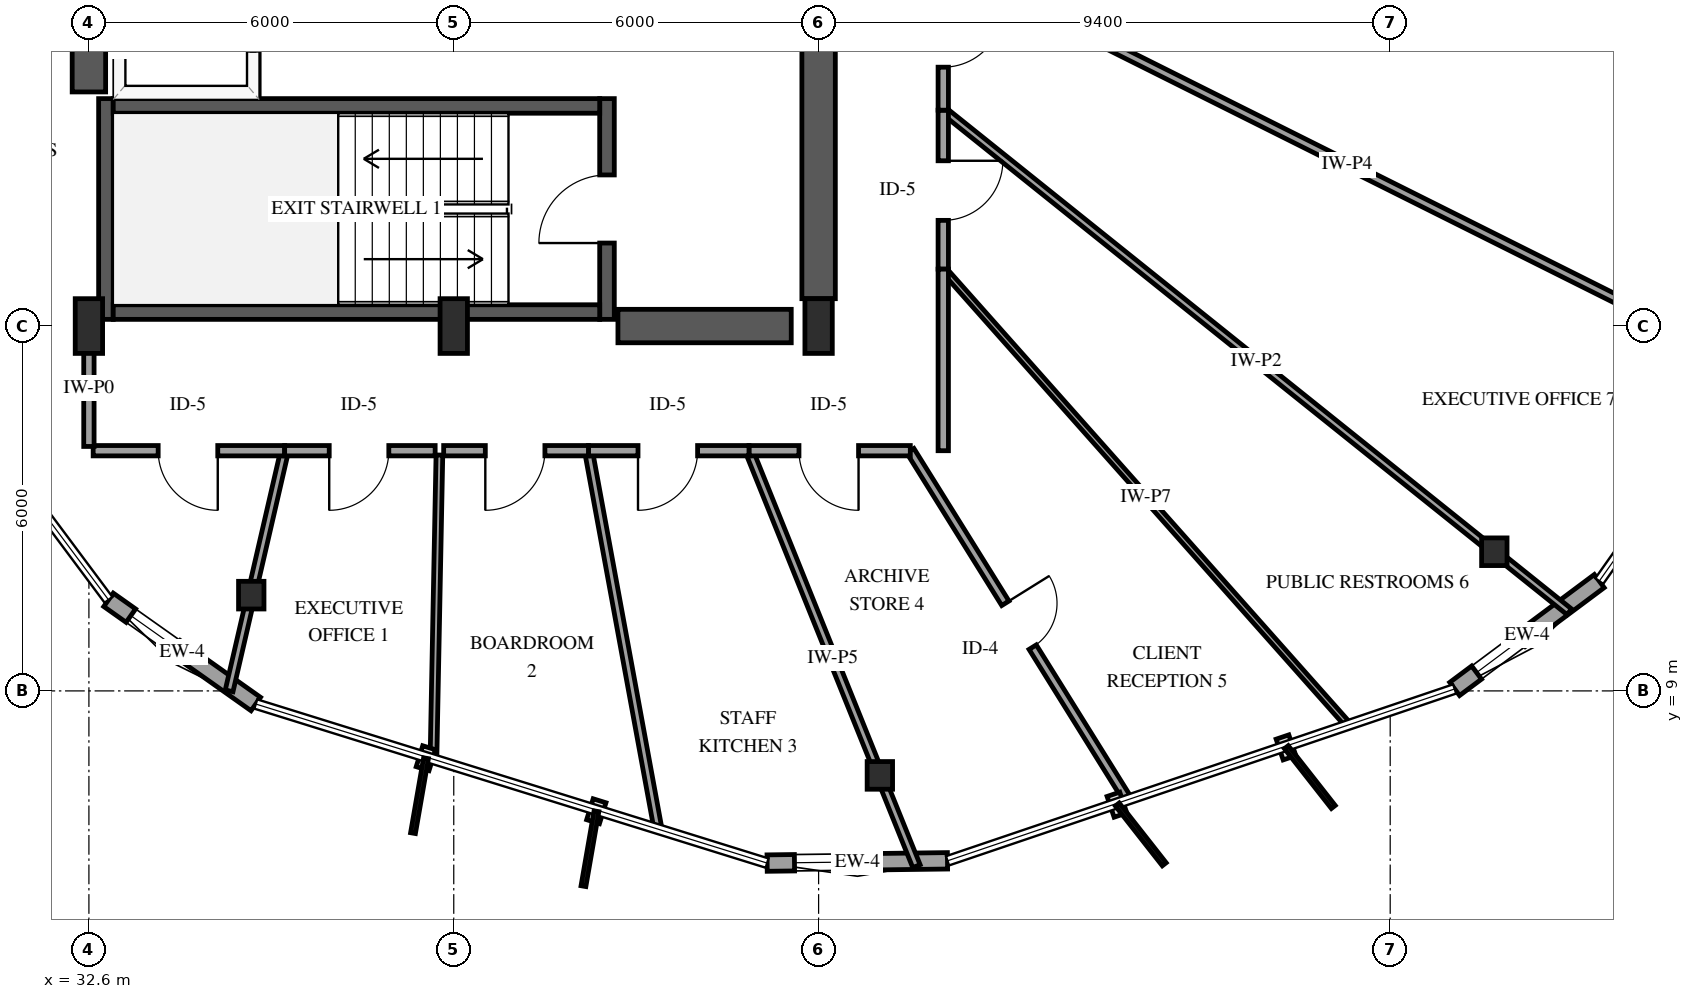
"""IFC4 building model, lengths in metres.
Left out: names, types, materials, properties, quantities, classifications, styles, units other than length and angle.
Written with IfcOpenShell. Run it as: python <this file> out.ifc"""

import sys

from ifc_helpers import new_model, si_unit, direction, frame, frame_2d, origin, origin_2d, place, context, subcontext, project, spatial, rectangle, i_section, extrude, element, fill, save


model = new_model("IFC4")
c1 = context("Model", 3, precision=1e-05, world=origin(), true_north=direction((0.0, 1.0)))
c2 = subcontext(c1, "Body", "Model", "MODEL_VIEW")
j1 = project(units=[si_unit("LENGTHUNIT", "METRE"), si_unit("PLANEANGLEUNIT", "RADIAN")], contexts=[c1])
p1 = place(None, origin())
s1 = spatial("IfcSite", under=j1, at=p1, CompositionType="ELEMENT")
p2 = place(p1, origin())
s2 = spatial("IfcBuilding", under=s1, at=p2, CompositionType="ELEMENT")
p3 = place(p2, frame((0.0, 0.0, 106.9)))
s3 = spatial("IfcBuildingStorey", under=s2, at=p3, CompositionType="ELEMENT", Elevation=106.9)
p4 = place(p3, frame((32.88, 15.11, 0.0), z_axis=(0.0, 0.0, 1.0), x_axis=(0.0, 1.0, 0.0)))
e1 = element("IfcWall", 1, at=p4, inside=s3, PredefinedType="SHEAR", context=c2, shape_type="SweptSolid", body=[
    extrude(rectangle(XDim=3.63, YDim=0.24, at=frame_2d((1.815, 0.0))), origin(), (0.0, 0.0, 1.0), 3.9),
])
p5 = place(p3, frame((41.12, 15.11, 0.0), z_axis=(0.0, 0.0, 1.0), x_axis=(0.0, 1.0, 0.0)))
e2 = element("IfcWall", 2, at=p5, inside=s3, PredefinedType="SHEAR", context=c2, shape_type="SweptSolid", body=[
    extrude(rectangle(XDim=3.63, YDim=0.24, at=frame_2d((1.815, 0.0))), origin(), (0.0, 0.0, 1.0), 3.9),
])
p6 = place(p5, frame((1.255, 0.0, 0.0)))
e3 = element("IfcOpeningElement", 3, at=p6, cuts=e2, PredefinedType="OPENING", context=c2, shape_type="SweptSolid", body=[
    extrude(rectangle(XDim=1.12, YDim=2.15, at=frame_2d((0.56, 1.075))), frame((0.0, 0.13, 0.0), z_axis=(0.0, -1.0, 0.0), x_axis=(1.0, 0.0, 0.0)), (0.0, 0.0, 1.0), 0.26),
])
for number, where, z_axis, x_axis in (
    (4, (33.0, 15.23, 0.0), (0.0, 0.0, 1.0), (1.0, 0.0, 0.0)),
    (5, (33.0, 18.62, 0.0), (0.0, 0.0, 1.0), (1.0, 0.0, 0.0)),
):
    element("IfcWall", number, at=place(p3, frame(where, z_axis=z_axis, x_axis=x_axis)), inside=s3, PredefinedType="SHEAR", context=c2, shape_type="SweptSolid", body=[
        extrude(rectangle(XDim=8.0, YDim=0.24, at=frame_2d((4.0, 0.0))), origin(), (0.0, 0.0, 1.0), 3.9),
    ])
p7 = place(p3, frame((32.6, 18.85, 0.0), z_axis=(0.0, 0.0, 1.0), x_axis=(0.0, 1.0, 0.0)))
e6 = element("IfcWall", 6, at=p7, inside=s3, PredefinedType="SHEAR", context=c2, shape_type="SweptSolid", body=[
    extrude(rectangle(XDim=12.3, YDim=0.55, at=frame_2d((6.15, 0.0))), origin(), (0.0, 0.0, 1.0), 3.9),
])
p8 = place(p3, frame((41.3, 15.0, 0.0), z_axis=(0.0, 0.0, 1.0), x_axis=(1.0, 0.0, 0.0)))
e7 = element("IfcWall", 7, at=p8, inside=s3, PredefinedType="SHEAR", context=c2, shape_type="SweptSolid", body=[
    extrude(rectangle(XDim=2.85, YDim=0.55, at=frame_2d((1.425, 0.0))), origin(), (0.0, 0.0, 1.0), 3.9),
])
p9 = place(p3, frame((44.6, 15.45, 0.0), z_axis=(0.0, 0.0, 1.0), x_axis=(0.0, 1.0, 0.0)))
e8 = element("IfcWall", 8, at=p9, inside=s3, PredefinedType="SHEAR", context=c2, shape_type="SweptSolid", body=[
    extrude(rectangle(XDim=6.35, YDim=0.55, at=frame_2d((3.175, 0.0))), origin(), (0.0, 0.0, 1.0), 3.9),
])
for number, where, z_axis, x_axis in (
    (9, (32.6, 15.0, 0.0), (0.0, 0.0, 1.0), (1.0, 0.0, 0.0)),
    (10, (38.6, 15.0, 0.0), (0.0, 0.0, 1.0), (1.0, 0.0, 0.0)),
    (11, (44.6, 15.0, 0.0), (0.0, 0.0, 1.0), (1.0, 0.0, 0.0)),
):
    element("IfcColumn", number, at=place(p3, frame(where, z_axis=z_axis, x_axis=x_axis)), inside=s3, PredefinedType="PILASTER", context=c2, shape_type="SweptSolid", body=[
        extrude(rectangle(XDim=0.45, YDim=0.9, at=origin_2d()), origin(), (0.0, 0.0, 1.0), 3.9),
    ])
for number, where, z_axis, x_axis in (
    (12, (35.27, 10.575, 0.0), (0.0, 0.0, 1.0), (1.0, 0.0, 0.0)),
    (13, (45.607, 7.611, 0.0), (0.0, 0.0, 1.0), (1.0, 0.0, 0.0)),
    (14, (55.712, 11.289, 0.0), (0.0, 0.0, 1.0), (1.0, 0.0, 0.0)),
):
    element("IfcColumn", number, at=place(p3, frame(where, z_axis=z_axis, x_axis=x_axis)), inside=s3, PredefinedType="COLUMN", context=c2, shape_type="SweptSolid", body=[
        extrude(i_section(OverallWidth=0.418, OverallDepth=0.455, WebThickness=0.042, FlangeThickness=0.068, FilletRadius=0.038, at=origin_2d()), origin(), (0.0, 0.0, 1.0), 3.9),
    ])
p10 = place(p3, frame((32.923, 10.498, 0.0), z_axis=(0.0, 0.0, 1.0), x_axis=(0.816333298617, -0.577581116009, 0.0)))
e15 = element("IfcWall", 15, at=p10, inside=s3, PredefinedType="SOLIDWALL", context=c2, shape_type="SweptSolid", body=[
    extrude(rectangle(XDim=2.967, YDim=0.27, at=frame_2d((1.483, 0.0))), origin(), (0.0, 0.0, 1.0), 2.979),
])
p11 = place(p10, frame((0.45, 0.0, 0.75)))
e16 = element("IfcOpeningElement", 16, at=p11, cuts=e15, PredefinedType="OPENING", context=c2, shape_type="SweptSolid", body=[
    extrude(rectangle(XDim=0.9, YDim=1.5, at=frame_2d((0.45, 0.75))), frame((0.0, 0.145, 0.0), z_axis=(0.0, -1.0, 0.0), x_axis=(1.0, 0.0, 0.0)), (0.0, 0.0, 1.0), 0.29),
])
p12 = place(p3, frame((43.753, 6.168, 0.0), z_axis=(0.0, 0.0, 1.0), x_axis=(0.999920709684, 0.012592630552, 0.0)))
e17 = element("IfcWall", 17, at=p12, inside=s3, PredefinedType="SOLIDWALL", context=c2, shape_type="SweptSolid", body=[
    extrude(rectangle(XDim=2.966, YDim=0.27, at=frame_2d((1.483, 0.0))), origin(), (0.0, 0.0, 1.0), 2.979),
])
p13 = place(p12, frame((0.45, 0.0, 0.75)))
e18 = element("IfcOpeningElement", 18, at=p13, cuts=e17, PredefinedType="OPENING", context=c2, shape_type="SweptSolid", body=[
    extrude(rectangle(XDim=0.9, YDim=1.5, at=frame_2d((0.45, 0.75))), frame((0.0, 0.145, 0.0), z_axis=(0.0, -1.0, 0.0), x_axis=(1.0, 0.0, 0.0)), (0.0, 0.0, 1.0), 0.29),
])
p14 = place(p3, frame((55.06, 9.032, 0.0), z_axis=(0.0, 0.0, 1.0), x_axis=(0.801547915112, 0.597930547622, 0.0)))
e19 = element("IfcWall", 19, at=p14, inside=s3, PredefinedType="SOLIDWALL", context=c2, shape_type="SweptSolid", body=[
    extrude(rectangle(XDim=2.966, YDim=0.27, at=frame_2d((1.483, 0.0))), origin(), (0.0, 0.0, 1.0), 2.979),
])
p15 = place(p14, frame((0.45, 0.0, 0.75)))
e20 = element("IfcOpeningElement", 20, at=p15, cuts=e19, PredefinedType="OPENING", context=c2, shape_type="SweptSolid", body=[
    extrude(rectangle(XDim=0.9, YDim=1.5, at=frame_2d((0.45, 0.75))), frame((0.0, 0.145, 0.0), z_axis=(0.0, -1.0, 0.0), x_axis=(1.0, 0.0, 0.0)), (0.0, 0.0, 1.0), 0.29),
])
p16 = place(p3, frame((35.3, 18.79, 0.0), z_axis=(0.0, 0.0, 1.0), x_axis=(0.0, 1.0, 0.0)))
e21 = element("IfcWall", 21, at=p16, inside=s3, PredefinedType="SOLIDWALL", context=c2, shape_type="SweptSolid", body=[
    extrude(rectangle(XDim=2.55, YDim=0.2, at=frame_2d((1.275, 0.0))), origin(), (0.0, 0.0, 1.0), 3.6),
])
p17 = place(p16, frame((0.725, 0.0, 0.0)))
e22 = element("IfcOpeningElement", 22, at=p17, cuts=e21, PredefinedType="OPENING", context=c2, shape_type="SweptSolid", body=[
    extrude(rectangle(XDim=1.1, YDim=2.15, at=frame_2d((0.55, 1.075))), frame((0.0, 0.11, 0.0), z_axis=(0.0, -1.0, 0.0), x_axis=(1.0, 0.0, 0.0)), (0.0, 0.0, 1.0), 0.22),
])
p18 = place(p3, frame((46.65, 20.975, 0.0), z_axis=(0.0, 0.0, 1.0), x_axis=(0.894492933533, -0.447082086266, 0.0)))
e23 = element("IfcWall", 23, at=p18, inside=s3, PredefinedType="PARTITIONING", context=c2, shape_type="SweptSolid", body=[
    extrude(rectangle(XDim=14.852, YDim=0.14, at=frame_2d((7.426, 0.0))), origin(), (0.0, 0.0, 1.0), 3.6),
])
p19 = place(p3, frame((46.65, 18.55, 0.0), z_axis=(0.0, 0.0, 1.0), x_axis=(0.780391932211, -0.625290678117, 0.0)))
e24 = element("IfcWall", 24, at=p19, inside=s3, PredefinedType="PARTITIONING", context=c2, shape_type="SweptSolid", body=[
    extrude(rectangle(XDim=13.192, YDim=0.12, at=frame_2d((6.596, 0.0))), origin(), (0.0, 0.0, 1.0), 2.978),
])
p20 = place(p3, frame((46.65, 15.936, 0.0), z_axis=(0.0, 0.0, 1.0), x_axis=(0.66409177884, -0.747651061176, 0.0)))
e25 = element("IfcWall", 25, at=p20, inside=s3, PredefinedType="PARTITIONING", context=c2, shape_type="SweptSolid", body=[
    extrude(rectangle(XDim=10.028, YDim=0.1, at=frame_2d((5.014, 0.0))), origin(), (0.0, 0.0, 1.0), 2.978),
])
p21 = place(p3, frame((43.455, 12.95, 0.0), z_axis=(0.0, 0.0, 1.0), x_axis=(0.373857978329, -0.927485963258, 0.0)))
e26 = element("IfcWall", 26, at=p21, inside=s3, PredefinedType="PARTITIONING", context=c2, shape_type="SweptSolid", body=[
    extrude(rectangle(XDim=7.366, YDim=0.13, at=frame_2d((3.683, 0.0))), origin(), (0.0, 0.0, 1.0), 2.895),
])
p22 = place(p3, frame((46.108, 12.95, 0.0), z_axis=(0.0, 0.0, 1.0), x_axis=(0.528794527815, -0.848749873256, 0.0)))
e27 = element("IfcWall", 27, at=p22, inside=s3, PredefinedType="PARTITIONING", context=c2, shape_type="SweptSolid", body=[
    extrude(rectangle(XDim=6.763, YDim=0.14, at=frame_2d((3.381, 0.0))), origin(), (0.0, 0.0, 1.0), 3.6),
])
p23 = place(p22, frame((2.956, 0.0, 0.0)))
e28 = element("IfcOpeningElement", 28, at=p23, cuts=e27, PredefinedType="OPENING", context=c2, shape_type="SweptSolid", body=[
    extrude(rectangle(XDim=0.85, YDim=2.1, at=frame_2d((0.425, 1.05))), frame((0.0, 0.08, 0.0), z_axis=(0.0, -1.0, 0.0), x_axis=(1.0, 0.0, 0.0)), (0.0, 0.0, 1.0), 0.16),
])
p24 = place(p3, frame((40.815, 12.95, 0.0), z_axis=(0.0, 0.0, 1.0), x_axis=(0.180813774755, -0.983517350563, 0.0)))
e29 = element("IfcWall", 29, at=p24, inside=s3, PredefinedType="PARTITIONING", context=c2, shape_type="SweptSolid", body=[
    extrude(rectangle(XDim=6.327, YDim=0.13, at=frame_2d((3.164, 0.0))), origin(), (0.0, 0.0, 1.0), 2.974),
])
p25 = place(p3, frame((32.6, 21.411, 0.0), z_axis=(0.0, 0.0, 1.0), x_axis=(-0.858297424283, -0.513152542105, 0.0)))
e30 = element("IfcWall", 30, at=p25, inside=s3, PredefinedType="PARTITIONING", context=c2, shape_type="SweptSolid", body=[
    extrude(rectangle(XDim=6.177, YDim=0.12, at=frame_2d((3.089, 0.0))), origin(), (0.0, 0.0, 1.0), 3.6),
])
p26 = place(p3, frame((38.364, 12.879, 0.0), z_axis=(0.0, 0.0, 1.0), x_axis=(-0.019564866507, -0.99980858968, 0.0)))
e31 = element("IfcWall", 31, at=p26, inside=s3, PredefinedType="PARTITIONING", context=c2, shape_type="SweptSolid", body=[
    extrude(rectangle(XDim=5.004, YDim=0.11, at=frame_2d((2.502, 0.0))), origin(), (0.0, 0.0, 1.0), 3.6),
])
p27 = place(p3, frame((35.819, 12.95, 0.0), z_axis=(0.0, 0.0, 1.0), x_axis=(-0.225277405857, -0.974294663031, 0.0)))
e32 = element("IfcWall", 32, at=p27, inside=s3, PredefinedType="PARTITIONING", context=c2, shape_type="SweptSolid", body=[
    extrude(rectangle(XDim=4.053, YDim=0.13, at=frame_2d((2.027, 0.0))), origin(), (0.0, 0.0, 1.0), 2.895),
])
p28 = place(p3, frame((35.819, 12.95, 0.0), z_axis=(0.0, 0.0, 1.0), x_axis=(-1.0, 0.0, 0.0)))
e33 = element("IfcWall", 33, at=p28, inside=s3, PredefinedType="PARTITIONING", context=c2, shape_type="SweptSolid", body=[
    extrude(rectangle(XDim=3.149, YDim=0.17, at=frame_2d((1.575, 0.0))), origin(), (0.0, 0.0, 1.0), 3.6),
])
p29 = place(p28, frame((1.1, 0.0, 0.0)))
e34 = element("IfcOpeningElement", 34, at=p29, cuts=e33, PredefinedType="OPENING", context=c2, shape_type="SweptSolid", body=[
    extrude(rectangle(XDim=0.98, YDim=2.15, at=frame_2d((0.49, 1.075))), frame((0.0, 0.095, 0.0), z_axis=(0.0, -1.0, 0.0), x_axis=(1.0, 0.0, 0.0)), (0.0, 0.0, 1.0), 0.19),
])
p30 = place(p3, frame((46.108, 12.95, 0.0), z_axis=(0.0, 0.0, 1.0), x_axis=(-1.0, 0.0, 0.0)))
e35 = element("IfcWall", 35, at=p30, inside=s3, PredefinedType="PARTITIONING", context=c2, shape_type="SweptSolid", body=[
    extrude(rectangle(XDim=2.653, YDim=0.17, at=frame_2d((1.326, 0.0))), origin(), (0.0, 0.0, 1.0), 3.6),
])
p31 = place(p30, frame((0.851, 0.0, 0.0)))
e36 = element("IfcOpeningElement", 36, at=p31, cuts=e35, PredefinedType="OPENING", context=c2, shape_type="SweptSolid", body=[
    extrude(rectangle(XDim=0.98, YDim=2.15, at=frame_2d((0.49, 1.075))), frame((0.0, 0.095, 0.0), z_axis=(0.0, -1.0, 0.0), x_axis=(1.0, 0.0, 0.0)), (0.0, 0.0, 1.0), 0.19),
])
p32 = place(p3, frame((43.455, 12.95, 0.0), z_axis=(0.0, 0.0, 1.0), x_axis=(-1.0, 0.0, 0.0)))
e37 = element("IfcWall", 37, at=p32, inside=s3, PredefinedType="PARTITIONING", context=c2, shape_type="SweptSolid", body=[
    extrude(rectangle(XDim=2.64, YDim=0.17, at=frame_2d((1.32, 0.0))), origin(), (0.0, 0.0, 1.0), 3.6),
])
p33 = place(p32, frame((0.845, 0.0, 0.0)))
e38 = element("IfcOpeningElement", 38, at=p33, cuts=e37, PredefinedType="OPENING", context=c2, shape_type="SweptSolid", body=[
    extrude(rectangle(XDim=0.98, YDim=2.15, at=frame_2d((0.49, 1.075))), frame((0.0, 0.095, 0.0), z_axis=(0.0, -1.0, 0.0), x_axis=(1.0, 0.0, 0.0)), (0.0, 0.0, 1.0), 0.19),
])
p34 = place(p3, frame((46.65, 18.55, 0.0), z_axis=(0.0, 0.0, 1.0), x_axis=(0.0, -1.0, 0.0)))
e39 = element("IfcWall", 39, at=p34, inside=s3, PredefinedType="PARTITIONING", context=c2, shape_type="SweptSolid", body=[
    extrude(rectangle(XDim=2.614, YDim=0.17, at=frame_2d((1.307, 0.0))), origin(), (0.0, 0.0, 1.0), 3.6),
])
p35 = place(p34, frame((0.832, 0.0, 0.0)))
e40 = element("IfcOpeningElement", 40, at=p35, cuts=e39, PredefinedType="OPENING", context=c2, shape_type="SweptSolid", body=[
    extrude(rectangle(XDim=0.98, YDim=2.15, at=frame_2d((0.49, 1.075))), frame((0.0, 0.095, 0.0), z_axis=(0.0, -1.0, 0.0), x_axis=(1.0, 0.0, 0.0)), (0.0, 0.0, 1.0), 0.19),
])
p36 = place(p3, frame((38.294, 12.95, 0.0), z_axis=(0.0, 0.0, 1.0), x_axis=(-1.0, 0.0, 0.0)))
e41 = element("IfcWall", 41, at=p36, inside=s3, PredefinedType="PARTITIONING", context=c2, shape_type="SweptSolid", body=[
    extrude(rectangle(XDim=2.475, YDim=0.17, at=frame_2d((1.237, 0.0))), origin(), (0.0, 0.0, 1.0), 3.6),
])
p37 = place(p36, frame((0.762, 0.0, 0.0)))
e42 = element("IfcOpeningElement", 42, at=p37, cuts=e41, PredefinedType="OPENING", context=c2, shape_type="SweptSolid", body=[
    extrude(rectangle(XDim=0.98, YDim=2.15, at=frame_2d((0.49, 1.075))), frame((0.0, 0.095, 0.0), z_axis=(0.0, -1.0, 0.0), x_axis=(1.0, 0.0, 0.0)), (0.0, 0.0, 1.0), 0.19),
])
p38 = place(p3, frame((46.65, 20.975, 0.0), z_axis=(0.0, 0.0, 1.0), x_axis=(0.0, -1.0, 0.0)))
e43 = element("IfcWall", 43, at=p38, inside=s3, PredefinedType="PARTITIONING", context=c2, shape_type="SweptSolid", body=[
    extrude(rectangle(XDim=2.425, YDim=0.17, at=frame_2d((1.212, 0.0))), origin(), (0.0, 0.0, 1.0), 3.6),
])
p39 = place(p38, frame((0.738, 0.0, 0.0)))
e44 = element("IfcOpeningElement", 44, at=p39, cuts=e43, PredefinedType="OPENING", context=c2, shape_type="SweptSolid", body=[
    extrude(rectangle(XDim=0.98, YDim=2.15, at=frame_2d((0.49, 1.075))), frame((0.0, 0.095, 0.0), z_axis=(0.0, -1.0, 0.0), x_axis=(1.0, 0.0, 0.0)), (0.0, 0.0, 1.0), 0.19),
])
p40 = place(p3, frame((40.815, 12.95, 0.0), z_axis=(0.0, 0.0, 1.0), x_axis=(-1.0, 0.0, 0.0)))
e45 = element("IfcWall", 45, at=p40, inside=s3, PredefinedType="PARTITIONING", context=c2, shape_type="SweptSolid", body=[
    extrude(rectangle(XDim=2.381, YDim=0.17, at=frame_2d((1.19, 0.0))), origin(), (0.0, 0.0, 1.0), 3.6),
])
p41 = place(p40, frame((0.716, 0.0, 0.0)))
e46 = element("IfcOpeningElement", 46, at=p41, cuts=e45, PredefinedType="OPENING", context=c2, shape_type="SweptSolid", body=[
    extrude(rectangle(XDim=0.98, YDim=2.15, at=frame_2d((0.49, 1.075))), frame((0.0, 0.095, 0.0), z_axis=(0.0, -1.0, 0.0), x_axis=(1.0, 0.0, 0.0)), (0.0, 0.0, 1.0), 0.19),
])
p42 = place(p3, frame((32.6, 13.02, 0.0), z_axis=(0.0, 0.0, 1.0), x_axis=(0.0, 1.0, 0.0)))
e47 = element("IfcWall", 47, at=p42, inside=s3, PredefinedType="PARTITIONING", context=c2, shape_type="SweptSolid", body=[
    extrude(rectangle(XDim=1.91, YDim=0.17, at=frame_2d((0.955, 0.0))), origin(), (0.0, 0.0, 1.0), 3.6),
])
p43 = place(p3, frame((46.65, 15.936, 0.0), z_axis=(0.0, 0.0, 1.0), x_axis=(0.0, -1.0, 0.0)))
e48 = element("IfcWall", 48, at=p43, inside=s3, PredefinedType="PARTITIONING", context=c2, shape_type="SweptSolid", body=[
    extrude(rectangle(XDim=2.986, YDim=0.17, at=frame_2d((1.493, 0.0))), origin(), (0.0, 0.0, 1.0), 3.6),
])
p44 = place(p11, origin())
e49 = element("IfcWindow", 49, at=p44, inside=s3, PartitioningType="SINGLE_PANEL", PredefinedType="WINDOW", context=c2, shape_type="SweptSolid", body=[
    extrude(rectangle(XDim=0.9, YDim=1.5, at=frame_2d((0.45, 0.75))), frame((0.0, 0.03, 0.0), z_axis=(0.0, -1.0, 0.0), x_axis=(1.0, 0.0, 0.0)), (0.0, 0.0, 1.0), 0.06),
])
fill(e16, e49)
p45 = place(p13, origin())
e50 = element("IfcWindow", 50, at=p45, inside=s3, PartitioningType="SINGLE_PANEL", PredefinedType="WINDOW", context=c2, shape_type="SweptSolid", body=[
    extrude(rectangle(XDim=0.9, YDim=1.5, at=frame_2d((0.45, 0.75))), frame((0.0, 0.03, 0.0), z_axis=(0.0, -1.0, 0.0), x_axis=(1.0, 0.0, 0.0)), (0.0, 0.0, 1.0), 0.06),
])
fill(e18, e50)
p46 = place(p15, origin())
e51 = element("IfcWindow", 51, at=p46, inside=s3, PartitioningType="SINGLE_PANEL", PredefinedType="WINDOW", context=c2, shape_type="SweptSolid", body=[
    extrude(rectangle(XDim=0.9, YDim=1.5, at=frame_2d((0.45, 0.75))), frame((0.0, 0.03, 0.0), z_axis=(0.0, -1.0, 0.0), x_axis=(1.0, 0.0, 0.0)), (0.0, 0.0, 1.0), 0.06),
])
fill(e20, e51)
p47 = place(p6, origin())
e52 = element("IfcDoor", 52, at=p47, inside=s3, OperationType="SINGLE_SWING_LEFT", PredefinedType="DOOR", context=c2, shape_type="SweptSolid", body=[
    extrude(rectangle(XDim=1.12, YDim=2.15, at=frame_2d((0.56, 1.075))), frame((0.0, 0.025, 0.0), z_axis=(0.0, -1.0, 0.0), x_axis=(1.0, 0.0, 0.0)), (0.0, 0.0, 1.0), 0.05),
])
fill(e3, e52)
p48 = place(p23, origin())
e53 = element("IfcDoor", 53, at=p48, inside=s3, OperationType="SINGLE_SWING_LEFT", PredefinedType="DOOR", context=c2, shape_type="SweptSolid", body=[
    extrude(rectangle(XDim=0.85, YDim=2.1, at=frame_2d((0.425, 1.05))), frame((0.0, 0.025, 0.0), z_axis=(0.0, -1.0, 0.0), x_axis=(1.0, 0.0, 0.0)), (0.0, 0.0, 1.0), 0.05),
])
fill(e28, e53)
p49 = place(p29, origin())
e54 = element("IfcDoor", 54, at=p49, inside=s3, OperationType="SINGLE_SWING_LEFT", PredefinedType="DOOR", context=c2, shape_type="SweptSolid", body=[
    extrude(rectangle(XDim=0.98, YDim=2.15, at=frame_2d((0.49, 1.075))), frame((0.0, 0.025, 0.0), z_axis=(0.0, -1.0, 0.0), x_axis=(1.0, 0.0, 0.0)), (0.0, 0.0, 1.0), 0.05),
])
fill(e34, e54)
p50 = place(p31, origin())
e55 = element("IfcDoor", 55, at=p50, inside=s3, OperationType="SINGLE_SWING_LEFT", PredefinedType="DOOR", context=c2, shape_type="SweptSolid", body=[
    extrude(rectangle(XDim=0.98, YDim=2.15, at=frame_2d((0.49, 1.075))), frame((0.0, 0.025, 0.0), z_axis=(0.0, -1.0, 0.0), x_axis=(1.0, 0.0, 0.0)), (0.0, 0.0, 1.0), 0.05),
])
fill(e36, e55)
p51 = place(p33, origin())
e56 = element("IfcDoor", 56, at=p51, inside=s3, OperationType="SINGLE_SWING_RIGHT", PredefinedType="DOOR", context=c2, shape_type="SweptSolid", body=[
    extrude(rectangle(XDim=0.98, YDim=2.15, at=frame_2d((0.49, 1.075))), frame((0.0, 0.025, 0.0), z_axis=(0.0, -1.0, 0.0), x_axis=(1.0, 0.0, 0.0)), (0.0, 0.0, 1.0), 0.05),
])
fill(e38, e56)
p52 = place(p35, origin())
e57 = element("IfcDoor", 57, at=p52, inside=s3, OperationType="SINGLE_SWING_LEFT", PredefinedType="DOOR", context=c2, shape_type="SweptSolid", body=[
    extrude(rectangle(XDim=0.98, YDim=2.15, at=frame_2d((0.49, 1.075))), frame((0.0, 0.025, 0.0), z_axis=(0.0, -1.0, 0.0), x_axis=(1.0, 0.0, 0.0)), (0.0, 0.0, 1.0), 0.05),
])
fill(e40, e57)
p53 = place(p37, origin())
e58 = element("IfcDoor", 58, at=p53, inside=s3, OperationType="SINGLE_SWING_RIGHT", PredefinedType="DOOR", context=c2, shape_type="SweptSolid", body=[
    extrude(rectangle(XDim=0.98, YDim=2.15, at=frame_2d((0.49, 1.075))), frame((0.0, 0.025, 0.0), z_axis=(0.0, -1.0, 0.0), x_axis=(1.0, 0.0, 0.0)), (0.0, 0.0, 1.0), 0.05),
])
fill(e42, e58)
p54 = place(p39, origin())
e59 = element("IfcDoor", 59, at=p54, inside=s3, OperationType="SINGLE_SWING_LEFT", PredefinedType="DOOR", context=c2, shape_type="SweptSolid", body=[
    extrude(rectangle(XDim=0.98, YDim=2.15, at=frame_2d((0.49, 1.075))), frame((0.0, 0.025, 0.0), z_axis=(0.0, -1.0, 0.0), x_axis=(1.0, 0.0, 0.0)), (0.0, 0.0, 1.0), 0.05),
])
fill(e44, e59)
p55 = place(p41, origin())
e60 = element("IfcDoor", 60, at=p55, inside=s3, OperationType="SINGLE_SWING_RIGHT", PredefinedType="DOOR", context=c2, shape_type="SweptSolid", body=[
    extrude(rectangle(XDim=0.98, YDim=2.15, at=frame_2d((0.49, 1.075))), frame((0.0, 0.025, 0.0), z_axis=(0.0, -1.0, 0.0), x_axis=(1.0, 0.0, 0.0)), (0.0, 0.0, 1.0), 0.05),
])
fill(e46, e60)
save(model, sys.argv[1])
